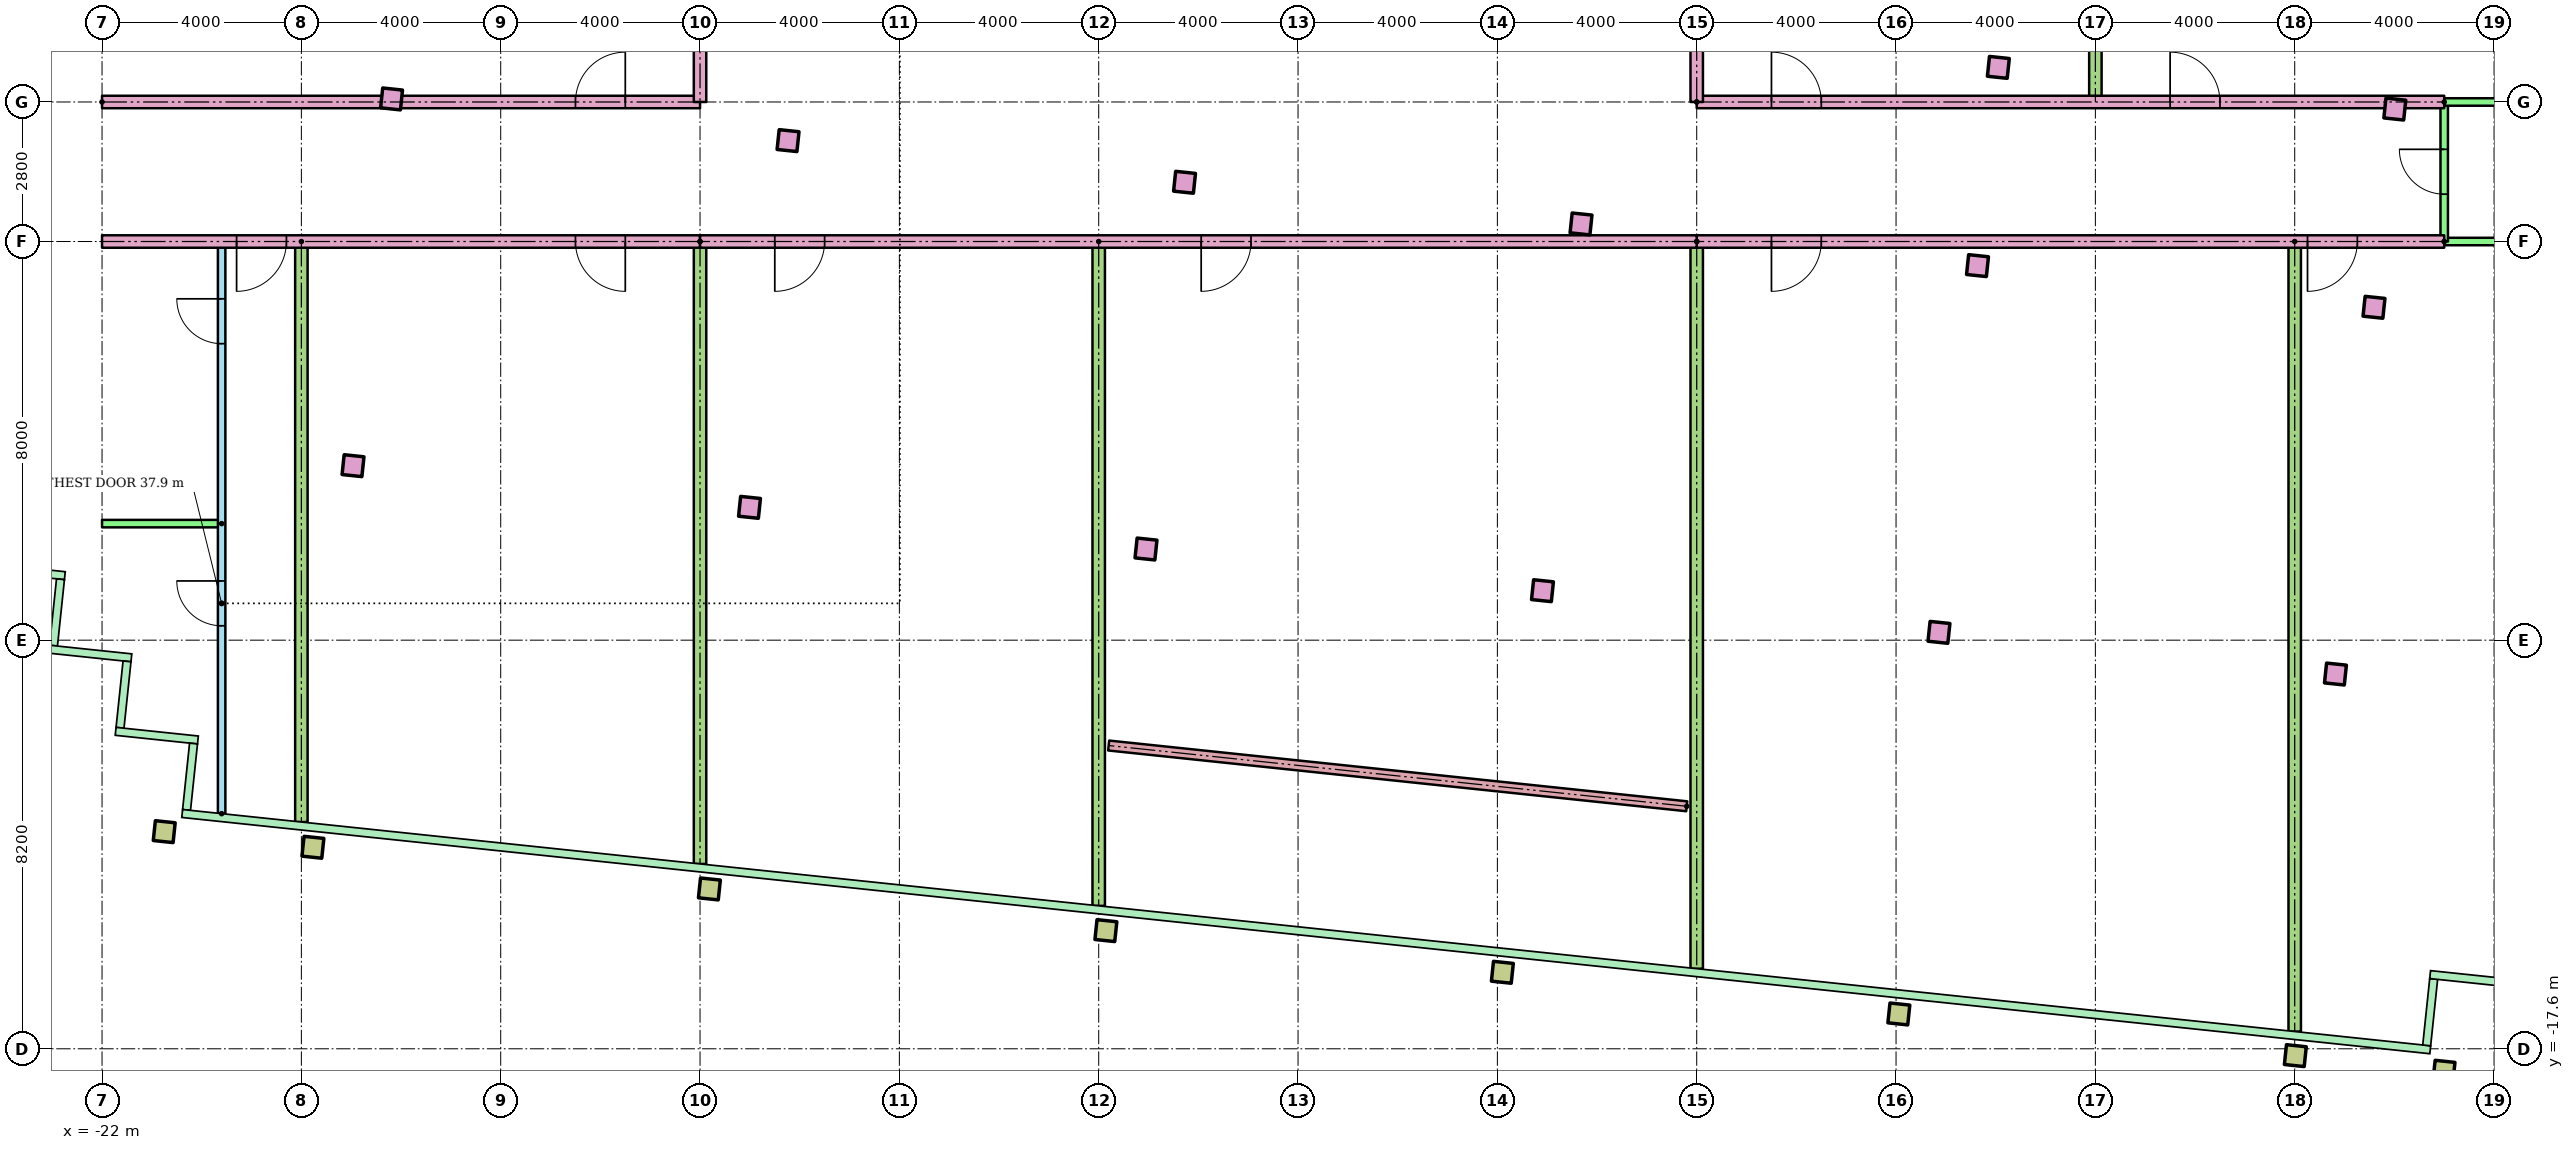
"""IFC4 building model, lengths in metres.
Left out: names, types, materials, properties, quantities, classifications, styles, units other than length and angle.
Written with IfcOpenShell. Run it as: python <this file> out.ifc"""

import sys

from ifc_helpers import new_model, si_unit, direction, frame, frame_2d, origin, origin_2d, place, context, subcontext, project, spatial, rectangle, hollow_rectangle, extrude, element, fill, save


model = new_model("IFC4")
c1 = context("Model", 3, precision=1e-05, world=origin(), true_north=direction((0.0, 1.0)))
c2 = subcontext(c1, "Body", "Model", "MODEL_VIEW")
j1 = project(units=[si_unit("LENGTHUNIT", "METRE"), si_unit("PLANEANGLEUNIT", "RADIAN")], contexts=[c1])
p1 = place(None, origin())
s1 = spatial("IfcSite", under=j1, at=p1, CompositionType="ELEMENT")
p2 = place(p1, origin())
s2 = spatial("IfcBuilding", under=s1, at=p2, CompositionType="ELEMENT")
p3 = place(p2, frame((0.0, 0.0, 294.9)))
s3 = spatial("IfcBuildingStorey", under=s2, at=p3, CompositionType="ELEMENT", Elevation=294.9)
for number, where, z_axis, x_axis in (
    (1, (-20.752, -13.243, 0.0), (0.0, 0.0, 1.0), (0.995, -0.105, 0.0)),
    (2, (-17.768, -13.556, 0.0), (0.0, 0.0, 1.0), (0.995, -0.105, 0.0)),
    (3, (-9.812, -14.392, 0.0), (0.0, 0.0, 1.0), (0.995, -0.105, 0.0)),
    (4, (-1.856, -15.229, 0.0), (0.0, 0.0, 1.0), (0.995, -0.105, 0.0)),
    (5, (6.1, -16.065, 0.0), (0.0, 0.0, 1.0), (0.995, -0.105, 0.0)),
    (6, (14.056, -16.901, 0.0), (0.0, 0.0, 1.0), (0.995, -0.105, 0.0)),
    (7, (22.012, -17.737, 0.0), (0.0, 0.0, 1.0), (0.995, -0.105, 0.0)),
    (8, (24.996, -18.051, 0.0), (0.0, 0.0, 1.0), (0.995, -0.105, 0.0)),
):
    element("IfcColumn", number, at=place(p3, frame(where, z_axis=z_axis, x_axis=x_axis)), inside=s3, PredefinedType="COLUMN", context=c2, shape_type="SweptSolid", body=[
        extrude(hollow_rectangle(XDim=0.4, YDim=0.4, WallThickness=0.02, at=origin_2d()), origin(), (0.0, 0.0, 1.0), 3.4),
    ])
for number, where, z_axis, x_axis in (
    (9, (-16.964, -5.898, 0.0), (0.0, 0.0, 1.0), (0.995, -0.105, 0.0)),
    (10, (-9.007, -6.735, 0.0), (0.0, 0.0, 1.0), (0.995, -0.105, 0.0)),
    (11, (-1.051, -7.571, 0.0), (0.0, 0.0, 1.0), (0.995, -0.105, 0.0)),
    (12, (6.905, -8.407, 0.0), (0.0, 0.0, 1.0), (0.995, -0.105, 0.0)),
    (13, (14.861, -9.243, 0.0), (0.0, 0.0, 1.0), (0.995, -0.105, 0.0)),
    (14, (22.817, -10.08, 0.0), (0.0, 0.0, 1.0), (0.995, -0.105, 0.0)),
    (15, (-16.19, 1.461, 0.0), (0.0, 0.0, 1.0), (0.995, -0.105, 0.0)),
    (16, (-8.234, 0.625, 0.0), (0.0, 0.0, 1.0), (0.995, -0.105, 0.0)),
    (17, (-0.278, -0.211, 0.0), (0.0, 0.0, 1.0), (0.995, -0.105, 0.0)),
    (18, (7.678, -1.048, 0.0), (0.0, 0.0, 1.0), (0.995, -0.105, 0.0)),
    (19, (15.635, -1.884, 0.0), (0.0, 0.0, 1.0), (0.995, -0.105, 0.0)),
    (20, (23.591, -2.72, 0.0), (0.0, 0.0, 1.0), (0.995, -0.105, 0.0)),
    (21, (16.053, 2.094, 0.0), (0.0, 0.0, 1.0), (0.995, -0.105, 0.0)),
    (22, (24.009, 1.258, 0.0), (0.0, 0.0, 1.0), (0.995, -0.105, 0.0)),
):
    element("IfcColumn", number, at=place(p3, frame(where, z_axis=z_axis, x_axis=x_axis)), inside=s3, PredefinedType="COLUMN", context=c2, shape_type="SweptSolid", body=[
        extrude(rectangle(XDim=0.4, YDim=0.4, at=origin_2d()), origin(), (0.0, 0.0, 1.0), 3.4),
    ])
p4 = place(p3, frame((-10.0, -1.4, 0.0), z_axis=(0.0, 0.0, 1.0), x_axis=(-1.0, 0.0, 0.0)))
e23 = element("IfcWall", 23, at=p4, inside=s3, PredefinedType="PARTITIONING", context=c2, shape_type="SweptSolid", body=[
    extrude(rectangle(XDim=12.0, YDim=0.25, at=frame_2d((6.0, 0.0))), origin(), (0.0, 0.0, 1.0), 2.6),
])
p5 = place(p4, frame((1.5, 0.0, 0.0)))
e24 = element("IfcOpeningElement", 24, at=p5, cuts=e23, PredefinedType="OPENING", context=c2, shape_type="SweptSolid", body=[
    extrude(rectangle(XDim=1.0, YDim=2.1, at=frame_2d((0.5, 1.05))), frame((0.0, 0.135, 0.0), z_axis=(0.0, -1.0, 0.0), x_axis=(1.0, 0.0, 0.0)), (0.0, 0.0, 1.0), 0.27),
])
p6 = place(p4, frame((8.3, 0.0, 0.0)))
e25 = element("IfcOpeningElement", 25, at=p6, cuts=e23, PredefinedType="OPENING", context=c2, shape_type="SweptSolid", body=[
    extrude(rectangle(XDim=1.0, YDim=2.1, at=frame_2d((0.5, 1.05))), frame((0.0, 0.135, 0.0), z_axis=(0.0, -1.0, 0.0), x_axis=(1.0, 0.0, 0.0)), (0.0, 0.0, 1.0), 0.27),
])
p7 = place(p3, frame((-19.6, -12.882, 0.0), z_axis=(0.0, 0.0, 1.0), x_axis=(0.0, 1.0, 0.0)))
e26 = element("IfcWall", 26, at=p7, inside=s3, PredefinedType="PARTITIONING", context=c2, shape_type="SweptSolid", body=[
    extrude(rectangle(XDim=11.482, YDim=0.15, at=frame_2d((5.741, 0.0))), origin(), (0.0, 0.0, 1.0), 2.6),
])
p8 = place(p7, frame((9.432, 0.0, 0.0)))
e27 = element("IfcOpeningElement", 27, at=p8, cuts=e26, PredefinedType="OPENING", context=c2, shape_type="SweptSolid", body=[
    extrude(rectangle(XDim=0.9, YDim=2.1, at=frame_2d((0.45, 1.05))), frame((0.0, 0.085, 0.0), z_axis=(0.0, -1.0, 0.0), x_axis=(1.0, 0.0, 0.0)), (0.0, 0.0, 1.0), 0.17),
])
p9 = place(p7, frame((3.771, 0.0, 0.0)))
e28 = element("IfcOpeningElement", 28, at=p9, cuts=e26, PredefinedType="OPENING", context=c2, shape_type="SweptSolid", body=[
    extrude(rectangle(XDim=0.9, YDim=2.1, at=frame_2d((0.45, 1.05))), frame((0.0, 0.085, 0.0), z_axis=(0.0, -1.0, 0.0), x_axis=(1.0, 0.0, 0.0)), (0.0, 0.0, 1.0), 0.17),
])
p10 = place(p3, frame((-19.6, -7.061, 0.0), z_axis=(0.0, 0.0, 1.0), x_axis=(-1.0, 0.0, 0.0)))
e29 = element("IfcWall", 29, at=p10, inside=s3, PredefinedType="PARTITIONING", context=c2, shape_type="SweptSolid", body=[
    extrude(rectangle(XDim=2.4, YDim=0.15, at=frame_2d((1.2, 0.0))), origin(), (0.0, 0.0, 1.0), 2.6),
])
p11 = place(p3, frame((-18.0, -1.4, 0.0), z_axis=(0.0, 0.0, 1.0), x_axis=(0.0, -1.0, 0.0)))
e30 = element("IfcWall", 30, at=p11, inside=s3, PredefinedType="PARTITIONING", context=c2, shape_type="SweptSolid", body=[
    extrude(rectangle(XDim=11.65, YDim=0.25, at=frame_2d((5.825, 0.0))), origin(), (0.0, 0.0, 1.0), 2.6),
])
p12 = place(p3, frame((-10.0, -1.4, 0.0), z_axis=(0.0, 0.0, 1.0), x_axis=(0.0, -1.0, 0.0)))
e31 = element("IfcWall", 31, at=p12, inside=s3, PredefinedType="PARTITIONING", context=c2, shape_type="SweptSolid", body=[
    extrude(rectangle(XDim=12.491, YDim=0.25, at=frame_2d((6.246, 0.0))), origin(), (0.0, 0.0, 1.0), 2.6),
])
p13 = place(p3, frame((-22.0, 1.4, 0.0)))
e32 = element("IfcWall", 32, at=p13, inside=s3, PredefinedType="PARTITIONING", context=c2, shape_type="SweptSolid", body=[
    extrude(rectangle(XDim=12.0, YDim=0.25, at=frame_2d((6.0, 0.0))), origin(), (0.0, 0.0, 1.0), 2.6),
])
p14 = place(p13, frame((9.5, 0.0, 0.0)))
e33 = element("IfcOpeningElement", 33, at=p14, cuts=e32, PredefinedType="OPENING", context=c2, shape_type="SweptSolid", body=[
    extrude(rectangle(XDim=1.0, YDim=2.1, at=frame_2d((0.5, 1.05))), frame((0.0, 0.135, 0.0), z_axis=(0.0, -1.0, 0.0), x_axis=(1.0, 0.0, 0.0)), (0.0, 0.0, 1.0), 0.27),
])
p15 = place(p3, frame((25.0, -1.4, 0.0), z_axis=(0.0, 0.0, 1.0), x_axis=(-1.0, 0.0, 0.0)))
e34 = element("IfcWall", 34, at=p15, inside=s3, PredefinedType="PARTITIONING", context=c2, shape_type="SweptSolid", body=[
    extrude(rectangle(XDim=15.0, YDim=0.25, at=frame_2d((7.5, 0.0))), origin(), (0.0, 0.0, 1.0), 2.6),
])
p16 = place(p15, frame((12.5, 0.0, 0.0)))
e35 = element("IfcOpeningElement", 35, at=p16, cuts=e34, PredefinedType="OPENING", context=c2, shape_type="SweptSolid", body=[
    extrude(rectangle(XDim=1.0, YDim=2.1, at=frame_2d((0.5, 1.05))), frame((0.0, 0.135, 0.0), z_axis=(0.0, -1.0, 0.0), x_axis=(1.0, 0.0, 0.0)), (0.0, 0.0, 1.0), 0.27),
])
p17 = place(p15, frame((1.743, 0.0, 0.0)))
e36 = element("IfcOpeningElement", 36, at=p17, cuts=e34, PredefinedType="OPENING", context=c2, shape_type="SweptSolid", body=[
    extrude(rectangle(XDim=1.0, YDim=2.1, at=frame_2d((0.5, 1.05))), frame((0.0, 0.135, 0.0), z_axis=(0.0, -1.0, 0.0), x_axis=(1.0, 0.0, 0.0)), (0.0, 0.0, 1.0), 0.27),
])
p18 = place(p3, frame((30.798, -1.4, 0.0), z_axis=(0.0, 0.0, 1.0), x_axis=(-1.0, 0.0, 0.0)))
e37 = element("IfcWall", 37, at=p18, inside=s3, PredefinedType="PARTITIONING", context=c2, shape_type="SweptSolid", body=[
    extrude(rectangle(XDim=5.798, YDim=0.15, at=frame_2d((2.899, 0.0))), origin(), (0.0, 0.0, 1.0), 2.6),
])
p19 = place(p3, frame((25.0, -1.4, 0.0), z_axis=(0.0, 0.0, 1.0), x_axis=(0.0, 1.0, 0.0)))
e38 = element("IfcWall", 38, at=p19, inside=s3, PredefinedType="PARTITIONING", context=c2, shape_type="SweptSolid", body=[
    extrude(rectangle(XDim=2.8, YDim=0.15, at=frame_2d((1.4, 0.0))), origin(), (0.0, 0.0, 1.0), 2.6),
])
p20 = place(p19, frame((0.95, 0.0, 0.0)))
e39 = element("IfcOpeningElement", 39, at=p20, cuts=e38, PredefinedType="OPENING", context=c2, shape_type="SweptSolid", body=[
    extrude(rectangle(XDim=0.9, YDim=2.1, at=frame_2d((0.45, 1.05))), frame((0.0, 0.085, 0.0), z_axis=(0.0, -1.0, 0.0), x_axis=(1.0, 0.0, 0.0)), (0.0, 0.0, 1.0), 0.17),
])
p21 = place(p3, frame((10.0, -1.4, 0.0), z_axis=(0.0, 0.0, 1.0), x_axis=(0.0, -1.0, 0.0)))
e40 = element("IfcWall", 40, at=p21, inside=s3, PredefinedType="PARTITIONING", context=c2, shape_type="SweptSolid", body=[
    extrude(rectangle(XDim=14.593, YDim=0.25, at=frame_2d((7.297, 0.0))), origin(), (0.0, 0.0, 1.0), 2.6),
])
p22 = place(p3, frame((22.0, -1.4, 0.0), z_axis=(0.0, 0.0, 1.0), x_axis=(0.0, -1.0, 0.0)))
e41 = element("IfcWall", 41, at=p22, inside=s3, PredefinedType="PARTITIONING", context=c2, shape_type="SweptSolid", body=[
    extrude(rectangle(XDim=15.854, YDim=0.25, at=frame_2d((7.927, 0.0))), origin(), (0.0, 0.0, 1.0), 2.6),
])
p23 = place(p3, frame((10.0, 1.4, 0.0)))
e42 = element("IfcWall", 42, at=p23, inside=s3, PredefinedType="PARTITIONING", context=c2, shape_type="SweptSolid", body=[
    extrude(rectangle(XDim=15.0, YDim=0.25, at=frame_2d((7.5, 0.0))), origin(), (0.0, 0.0, 1.0), 2.6),
])
p24 = place(p23, frame((1.5, 0.0, 0.0)))
e43 = element("IfcOpeningElement", 43, at=p24, cuts=e42, PredefinedType="OPENING", context=c2, shape_type="SweptSolid", body=[
    extrude(rectangle(XDim=1.0, YDim=2.1, at=frame_2d((0.5, 1.05))), frame((0.0, 0.135, 0.0), z_axis=(0.0, -1.0, 0.0), x_axis=(1.0, 0.0, 0.0)), (0.0, 0.0, 1.0), 0.27),
])
p25 = place(p23, frame((9.5, 0.0, 0.0)))
e44 = element("IfcOpeningElement", 44, at=p25, cuts=e42, PredefinedType="OPENING", context=c2, shape_type="SweptSolid", body=[
    extrude(rectangle(XDim=1.0, YDim=2.1, at=frame_2d((0.5, 1.05))), frame((0.0, 0.135, 0.0), z_axis=(0.0, -1.0, 0.0), x_axis=(1.0, 0.0, 0.0)), (0.0, 0.0, 1.0), 0.27),
])
p26 = place(p3, frame((25.0, 1.4, 0.0)))
e45 = element("IfcWall", 45, at=p26, inside=s3, PredefinedType="PARTITIONING", context=c2, shape_type="SweptSolid", body=[
    extrude(rectangle(XDim=6.093, YDim=0.15, at=frame_2d((3.046, 0.0))), origin(), (0.0, 0.0, 1.0), 2.6),
])
p27 = place(p3, frame((18.0, 19.004, 0.0), z_axis=(0.0, 0.0, 1.0), x_axis=(0.0, -1.0, 0.0)))
e46 = element("IfcWall", 46, at=p27, inside=s3, PredefinedType="PARTITIONING", context=c2, shape_type="SweptSolid", body=[
    extrude(rectangle(XDim=17.604, YDim=0.25, at=frame_2d((8.802, 0.0))), origin(), (0.0, 0.0, 1.0), 2.6),
])
p28 = place(p3, frame((-2.0, -1.4, 0.0), z_axis=(0.0, 0.0, 1.0), x_axis=(0.0, -1.0, 0.0)))
e47 = element("IfcWall", 47, at=p28, inside=s3, PredefinedType="PARTITIONING", context=c2, shape_type="SweptSolid", body=[
    extrude(rectangle(XDim=13.332, YDim=0.25, at=frame_2d((6.666, 0.0))), origin(), (0.0, 0.0, 1.0), 2.6),
])
p29 = place(p3, frame((10.0, -1.4, 0.0), z_axis=(0.0, 0.0, 1.0), x_axis=(-1.0, 0.0, 0.0)))
e48 = element("IfcWall", 48, at=p29, inside=s3, PredefinedType="PARTITIONING", context=c2, shape_type="SweptSolid", body=[
    extrude(rectangle(XDim=20.0, YDim=0.25, at=frame_2d((10.0, 0.0))), origin(), (0.0, 0.0, 1.0), 2.6),
])
p30 = place(p29, frame((17.5, 0.0, 0.0)))
e49 = element("IfcOpeningElement", 49, at=p30, cuts=e48, PredefinedType="OPENING", context=c2, shape_type="SweptSolid", body=[
    extrude(rectangle(XDim=1.0, YDim=2.1, at=frame_2d((0.5, 1.05))), frame((0.0, 0.135, 0.0), z_axis=(0.0, -1.0, 0.0), x_axis=(1.0, 0.0, 0.0)), (0.0, 0.0, 1.0), 0.27),
])
p31 = place(p29, frame((8.944, 0.0, 0.0)))
e50 = element("IfcOpeningElement", 50, at=p31, cuts=e48, PredefinedType="OPENING", context=c2, shape_type="SweptSolid", body=[
    extrude(rectangle(XDim=1.0, YDim=2.1, at=frame_2d((0.5, 1.05))), frame((0.0, 0.135, 0.0), z_axis=(0.0, -1.0, 0.0), x_axis=(1.0, 0.0, 0.0)), (0.0, 0.0, 1.0), 0.27),
])
for number, where, z_axis, x_axis in (
    (51, (-10.0, 3.0, 0.0), (0.0, 0.0, 1.0), (0.0, -1.0, 0.0)),
    (52, (10.0, 1.4, 0.0), (0.0, 0.0, 1.0), (0.0, 1.0, 0.0)),
):
    element("IfcWall", number, at=place(p3, frame(where, z_axis=z_axis, x_axis=x_axis)), inside=s3, PredefinedType="PARTITIONING", context=c2, shape_type="SweptSolid", body=[
        extrude(rectangle(XDim=1.6, YDim=0.25, at=frame_2d((0.8, 0.0))), origin(), (0.0, 0.0, 1.0), 2.6),
    ])
p32 = place(p3, frame((9.8, -12.733, 0.0), z_axis=(0.0, 0.0, 1.0), x_axis=(-0.994521727026, 0.104530064923, 0.0)))
e53 = element("IfcWall", 53, at=p32, inside=s3, PredefinedType="PARTITIONING", context=c2, shape_type="SweptSolid", body=[
    extrude(rectangle(XDim=11.664, YDim=0.2, at=frame_2d((5.832, 0.0))), origin(), (0.0, 0.0, 1.0), 0.9),
])
p33 = place(p5, origin())
e54 = element("IfcDoor", 54, at=p33, inside=s3, OperationType="SINGLE_SWING_LEFT", PredefinedType="DOOR", context=c2, shape_type="SweptSolid", body=[
    extrude(rectangle(XDim=1.0, YDim=2.1, at=frame_2d((0.5, 1.05))), frame((0.0, 0.025, 0.0), z_axis=(0.0, -1.0, 0.0), x_axis=(1.0, 0.0, 0.0)), (0.0, 0.0, 1.0), 0.05),
])
fill(e24, e54)
p34 = place(p8, origin())
e55 = element("IfcDoor", 55, at=p34, inside=s3, OperationType="SINGLE_SWING_RIGHT", PredefinedType="DOOR", context=c2, shape_type="SweptSolid", body=[
    extrude(rectangle(XDim=0.9, YDim=2.1, at=frame_2d((0.45, 1.05))), frame((0.0, 0.025, 0.0), z_axis=(0.0, -1.0, 0.0), x_axis=(1.0, 0.0, 0.0)), (0.0, 0.0, 1.0), 0.05),
])
fill(e27, e55)
p35 = place(p9, origin())
e56 = element("IfcDoor", 56, at=p35, inside=s3, OperationType="SINGLE_SWING_RIGHT", PredefinedType="DOOR", context=c2, shape_type="SweptSolid", body=[
    extrude(rectangle(XDim=0.9, YDim=2.1, at=frame_2d((0.45, 1.05))), frame((0.0, 0.025, 0.0), z_axis=(0.0, -1.0, 0.0), x_axis=(1.0, 0.0, 0.0)), (0.0, 0.0, 1.0), 0.05),
])
fill(e28, e56)
p36 = place(p6, origin())
e57 = element("IfcDoor", 57, at=p36, inside=s3, OperationType="SINGLE_SWING_RIGHT", PredefinedType="DOOR", context=c2, shape_type="SweptSolid", body=[
    extrude(rectangle(XDim=1.0, YDim=2.1, at=frame_2d((0.5, 1.05))), frame((0.0, 0.025, 0.0), z_axis=(0.0, -1.0, 0.0), x_axis=(1.0, 0.0, 0.0)), (0.0, 0.0, 1.0), 0.05),
])
fill(e25, e57)
p37 = place(p14, origin())
e58 = element("IfcDoor", 58, at=p37, inside=s3, OperationType="SINGLE_SWING_RIGHT", PredefinedType="DOOR", context=c2, shape_type="SweptSolid", body=[
    extrude(rectangle(XDim=1.0, YDim=2.1, at=frame_2d((0.5, 1.05))), frame((0.0, 0.025, 0.0), z_axis=(0.0, -1.0, 0.0), x_axis=(1.0, 0.0, 0.0)), (0.0, 0.0, 1.0), 0.05),
])
fill(e33, e58)
p38 = place(p16, origin())
e59 = element("IfcDoor", 59, at=p38, inside=s3, OperationType="SINGLE_SWING_RIGHT", PredefinedType="DOOR", context=c2, shape_type="SweptSolid", body=[
    extrude(rectangle(XDim=1.0, YDim=2.1, at=frame_2d((0.5, 1.05))), frame((0.0, 0.025, 0.0), z_axis=(0.0, -1.0, 0.0), x_axis=(1.0, 0.0, 0.0)), (0.0, 0.0, 1.0), 0.05),
])
fill(e35, e59)
p39 = place(p17, origin())
e60 = element("IfcDoor", 60, at=p39, inside=s3, OperationType="SINGLE_SWING_RIGHT", PredefinedType="DOOR", context=c2, shape_type="SweptSolid", body=[
    extrude(rectangle(XDim=1.0, YDim=2.1, at=frame_2d((0.5, 1.05))), frame((0.0, 0.025, 0.0), z_axis=(0.0, -1.0, 0.0), x_axis=(1.0, 0.0, 0.0)), (0.0, 0.0, 1.0), 0.05),
])
fill(e36, e60)
p40 = place(p20, origin())
e61 = element("IfcDoor", 61, at=p40, inside=s3, OperationType="SINGLE_SWING_RIGHT", PredefinedType="DOOR", context=c2, shape_type="SweptSolid", body=[
    extrude(rectangle(XDim=0.9, YDim=2.1, at=frame_2d((0.45, 1.05))), frame((0.0, 0.025, 0.0), z_axis=(0.0, -1.0, 0.0), x_axis=(1.0, 0.0, 0.0)), (0.0, 0.0, 1.0), 0.05),
])
fill(e39, e61)
p41 = place(p24, origin())
e62 = element("IfcDoor", 62, at=p41, inside=s3, OperationType="SINGLE_SWING_LEFT", PredefinedType="DOOR", context=c2, shape_type="SweptSolid", body=[
    extrude(rectangle(XDim=1.0, YDim=2.1, at=frame_2d((0.5, 1.05))), frame((0.0, 0.025, 0.0), z_axis=(0.0, -1.0, 0.0), x_axis=(1.0, 0.0, 0.0)), (0.0, 0.0, 1.0), 0.05),
])
fill(e43, e62)
p42 = place(p25, origin())
e63 = element("IfcDoor", 63, at=p42, inside=s3, OperationType="SINGLE_SWING_LEFT", PredefinedType="DOOR", context=c2, shape_type="SweptSolid", body=[
    extrude(rectangle(XDim=1.0, YDim=2.1, at=frame_2d((0.5, 1.05))), frame((0.0, 0.025, 0.0), z_axis=(0.0, -1.0, 0.0), x_axis=(1.0, 0.0, 0.0)), (0.0, 0.0, 1.0), 0.05),
])
fill(e44, e63)
p43 = place(p30, origin())
e64 = element("IfcDoor", 64, at=p43, inside=s3, OperationType="SINGLE_SWING_RIGHT", PredefinedType="DOOR", context=c2, shape_type="SweptSolid", body=[
    extrude(rectangle(XDim=1.0, YDim=2.1, at=frame_2d((0.5, 1.05))), frame((0.0, 0.025, 0.0), z_axis=(0.0, -1.0, 0.0), x_axis=(1.0, 0.0, 0.0)), (0.0, 0.0, 1.0), 0.05),
])
fill(e49, e64)
p44 = place(p31, origin())
e65 = element("IfcDoor", 65, at=p44, inside=s3, OperationType="SINGLE_SWING_RIGHT", PredefinedType="DOOR", context=c2, shape_type="SweptSolid", body=[
    extrude(rectangle(XDim=1.0, YDim=2.1, at=frame_2d((0.5, 1.05))), frame((0.0, 0.025, 0.0), z_axis=(0.0, -1.0, 0.0), x_axis=(1.0, 0.0, 0.0)), (0.0, 0.0, 1.0), 0.05),
])
fill(e50, e65)
save(model, sys.argv[1])
